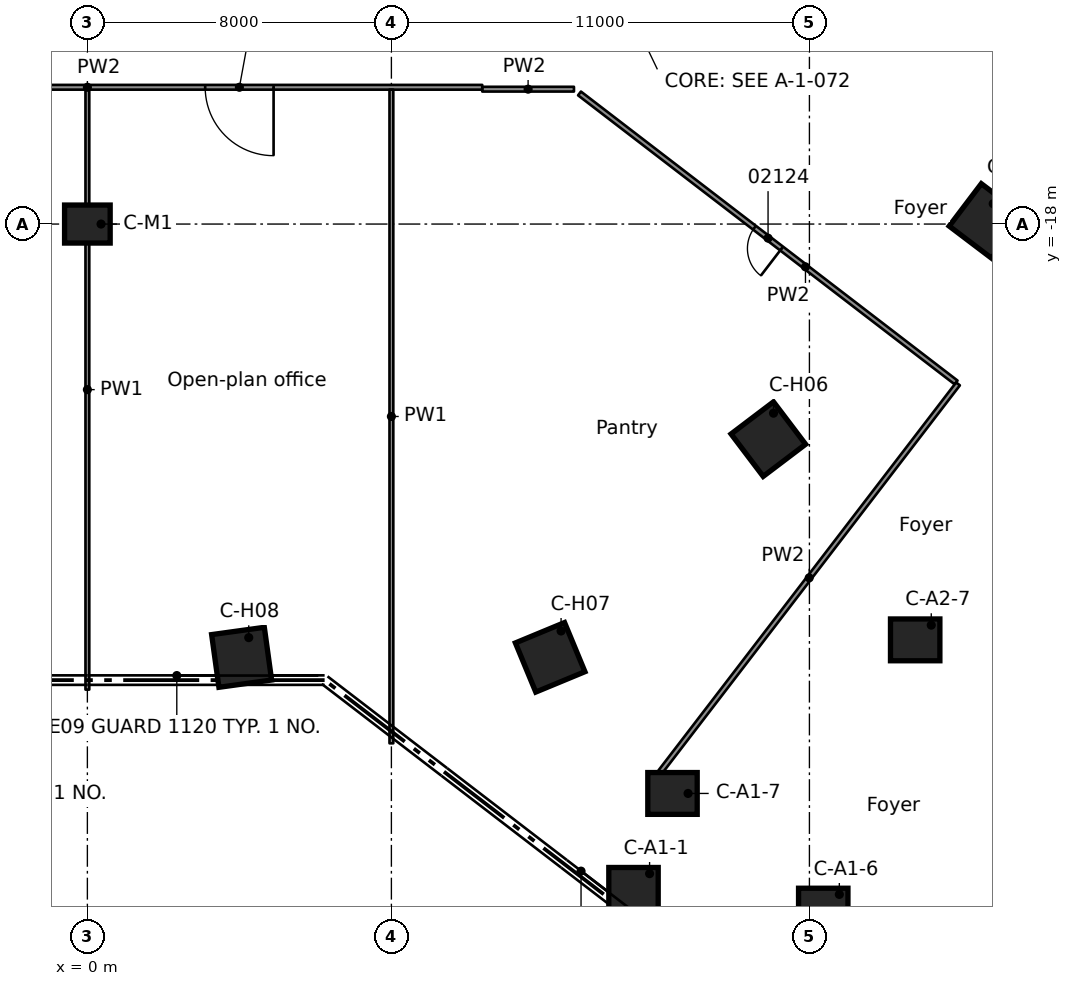
"""IFC4 building model, lengths in metres.
Left out: names, types, materials, properties, quantities, classifications, styles, units other than length and angle.
Written with IfcOpenShell. Run it as: python <this file> out.ifc"""

import sys

from ifc_helpers import new_model, si_unit, direction, frame, frame_2d, origin, origin_2d, place, context, subcontext, project, spatial, rectangle, extrude, element, fill, save


model = new_model("IFC4")
c1 = context("Model", 3, precision=1e-05, world=origin(), true_north=direction((0.0, 1.0)))
c2 = subcontext(c1, "Body", "Model", "MODEL_VIEW")
j1 = project(units=[si_unit("LENGTHUNIT", "METRE"), si_unit("PLANEANGLEUNIT", "RADIAN")], contexts=[c1])
p1 = place(None, origin())
s1 = spatial("IfcSite", under=j1, at=p1, CompositionType="ELEMENT")
p2 = place(p1, origin())
s2 = spatial("IfcBuilding", under=s1, at=p2, CompositionType="ELEMENT")
p3 = place(p2, frame((0.0, 0.0, 10.5)))
s3 = spatial("IfcBuildingStorey", under=s2, at=p3, CompositionType="ELEMENT", Elevation=10.5)
p4 = place(p3, frame((14.371, -35.48, -1.0), z_axis=(0.0, 0.0, 1.0), x_axis=(0.707106781187, 0.707106781187, 0.0)))
e1 = element("IfcColumn", 1, at=p4, inside=s3, PredefinedType="COLUMN", context=c2, shape_type="SweptSolid", body=[
    extrude(rectangle(XDim=2.4, YDim=2.4, at=origin_2d()), origin(), (0.0, 0.0, 1.0), 1.0),
])
p5 = place(p3, frame((19.364, -36.026, -1.0), z_axis=(0.0, 0.0, 1.0), x_axis=(0.707106781187, 0.707106781187, 0.0)))
e2 = element("IfcColumn", 2, at=p5, inside=s3, PredefinedType="COLUMN", context=c2, shape_type="SweptSolid", body=[
    extrude(rectangle(XDim=3.4, YDim=3.4, at=origin_2d()), origin(), (0.0, 0.0, 1.0), 1.0),
])
p6 = place(p3, frame((15.397, -32.982, -1.0), z_axis=(0.0, 0.0, 1.0), x_axis=(0.707106781187, 0.707106781187, 0.0)))
e3 = element("IfcColumn", 3, at=p6, inside=s3, PredefinedType="COLUMN", context=c2, shape_type="SweptSolid", body=[
    extrude(rectangle(XDim=2.4, YDim=2.4, at=origin_2d()), origin(), (0.0, 0.0, 1.0), 1.0),
])
p7 = place(p3, frame((25.274, -31.62, -1.0), z_axis=(0.0, 0.0, 1.0), x_axis=(0.707106781187, 0.707106781187, 0.0)))
e4 = element("IfcColumn", 4, at=p7, inside=s3, PredefinedType="COLUMN", context=c2, shape_type="SweptSolid", body=[
    extrude(rectangle(XDim=2.55, YDim=2.55, at=origin_2d()), origin(), (0.0, 0.0, 1.0), 1.0),
])
for number, where, z_axis, x_axis in (
    (5, (21.783, -28.941, -1.0), (0.0, 0.0, 1.0), (0.707, 0.707, 0.0)),
    (6, (23.659, -17.919, -1.0), (0.0, 0.0, 1.0), (0.707, 0.707, 0.0)),
    (7, (17.919, -23.659, -1.0), (0.0, 0.0, 1.0), (0.707, 0.707, 0.0)),
    (8, (12.178, -29.4, -1.0), (0.0, 0.0, 1.0), (0.707, 0.707, 0.0)),
    (9, (4.059, -29.4, -1.0), (0.0, 0.0, 1.0), (0.707, 0.707, 0.0)),
):
    element("IfcColumn", number, at=place(p3, frame(where, z_axis=z_axis, x_axis=x_axis)), inside=s3, PredefinedType="COLUMN", context=c2, shape_type="SweptSolid", body=[
        extrude(rectangle(XDim=3.4, YDim=3.4, at=origin_2d()), origin(), (0.0, 0.0, 1.0), 1.0),
    ])
for number, where, z_axis, x_axis in (
    (10, (14.371, -35.48, 0.0), (0.0, 0.0, 1.0), (1.0, 0.0, 0.0)),
    (11, (19.364, -36.026, 0.0), (0.0, 0.0, 1.0), (1.0, 0.0, 0.0)),
    (12, (15.397, -32.982, 0.0), (0.0, 0.0, 1.0), (1.0, 0.0, 0.0)),
    (13, (21.783, -28.941, 0.0), (0.0, 0.0, 1.0), (1.0, 0.0, 0.0)),
):
    element("IfcColumn", number, at=place(p3, frame(where, z_axis=z_axis, x_axis=x_axis)), inside=s3, PredefinedType="COLUMN", context=c2, shape_type="SweptSolid", body=[
        extrude(rectangle(XDim=1.3, YDim=1.1, at=origin_2d()), origin(), (0.0, 0.0, 1.0), 5.0),
    ])
for number, where, z_axis, x_axis in (
    (14, (23.659, -17.919, 0.0), (0.0, 0.0, 1.0), (0.797, -0.604, 0.0)),
    (15, (17.919, -23.659, 0.0), (0.0, 0.0, 1.0), (0.604, -0.797, 0.0)),
    (16, (12.178, -29.4, 0.0), (0.0, 0.0, 1.0), (0.383, -0.924, 0.0)),
    (17, (4.059, -29.4, 0.0), (0.0, 0.0, 1.0), (0.137, -0.991, 0.0)),
):
    element("IfcColumn", number, at=place(p3, frame(where, z_axis=z_axis, x_axis=x_axis)), inside=s3, PredefinedType="COLUMN", context=c2, shape_type="SweptSolid", body=[
        extrude(rectangle(XDim=1.4, YDim=1.4, at=origin_2d()), origin(), (0.0, 0.0, 1.0), 5.0),
    ])
p8 = place(p3, frame((0.0, -18.0, 0.0), z_axis=(0.0, 0.0, 1.0), x_axis=(1.0, 0.0, 0.0)))
e18 = element("IfcColumn", 18, at=p8, inside=s3, PredefinedType="COLUMN", context=c2, shape_type="SweptSolid", body=[
    extrude(rectangle(XDim=1.2, YDim=1.0, at=origin_2d()), origin(), (0.0, 0.0, 1.0), 5.0),
])
p9 = place(p3, frame((22.86, -22.168, 0.0), z_axis=(0.0, 0.0, 1.0), x_axis=(-0.793328204451, 0.608794185274, 0.0)))
e19 = element("IfcWall", 19, at=p9, inside=s3, PredefinedType="PARTITIONING", context=c2, shape_type="SweptSolid", body=[
    extrude(rectangle(XDim=12.492, YDim=0.125, at=frame_2d((6.246, 0.0))), origin(), (0.0, 0.0, 1.0), 4.58),
])
p10 = place(p9, frame((5.788, 0.0, 0.0)))
e20 = element("IfcOpeningElement", 20, at=p10, cuts=e19, PredefinedType="OPENING", context=c2, shape_type="SweptSolid", body=[
    extrude(rectangle(XDim=0.9, YDim=2.1, at=frame_2d((0.45, 1.05))), frame((0.0, 0.073, 0.0), z_axis=(0.0, -1.0, 0.0), x_axis=(1.0, 0.0, 0.0)), (0.0, 0.0, 1.0), 0.145),
])
p11 = place(p3, frame((10.391, -14.451, 0.0), z_axis=(0.0, 0.0, 1.0), x_axis=(1.0, 0.0, 0.0)))
e21 = element("IfcWall", 21, at=p11, inside=s3, PredefinedType="PARTITIONING", context=c2, shape_type="SweptSolid", body=[
    extrude(rectangle(XDim=2.413, YDim=0.125, at=frame_2d((1.207, 0.0))), origin(), (0.0, 0.0, 1.0), 4.58),
])
p12 = place(p3, frame((10.391, -14.401, 0.0), z_axis=(0.0, 0.0, 1.0), x_axis=(-1.0, 0.0, 0.0)))
e22 = element("IfcWall", 22, at=p12, inside=s3, PredefinedType="PARTITIONING", context=c2, shape_type="SweptSolid", body=[
    extrude(rectangle(XDim=20.781, YDim=0.125, at=frame_2d((10.391, 0.0))), origin(), (0.0, 0.0, 1.0), 4.58),
])
p13 = place(p12, frame((13.491, 0.0, 0.0)))
e23 = element("IfcOpeningElement", 23, at=p13, cuts=e22, PredefinedType="OPENING", context=c2, shape_type="SweptSolid", body=[
    extrude(rectangle(XDim=1.8, YDim=2.1, at=frame_2d((0.9, 1.05))), frame((0.0, 0.073, 0.0), z_axis=(0.0, -1.0, 0.0), x_axis=(1.0, 0.0, 0.0)), (0.0, 0.0, 1.0), 0.145),
])
p14 = place(p12, frame((5.491, 0.0, 0.0)))
e24 = element("IfcOpeningElement", 24, at=p14, cuts=e22, PredefinedType="OPENING", context=c2, shape_type="SweptSolid", body=[
    extrude(rectangle(XDim=1.8, YDim=2.1, at=frame_2d((0.9, 1.05))), frame((0.0, 0.073, 0.0), z_axis=(0.0, -1.0, 0.0), x_axis=(1.0, 0.0, 0.0)), (0.0, 0.0, 1.0), 0.145),
])
p15 = place(p3, frame((15.078, -32.412, 0.0), z_axis=(0.0, 0.0, 1.0), x_axis=(0.608793231938, 0.793328936033, 0.0)))
e25 = element("IfcWall", 25, at=p15, inside=s3, PredefinedType="PARTITIONING", context=c2, shape_type="SweptSolid", body=[
    extrude(rectangle(XDim=12.865, YDim=0.125, at=frame_2d((6.432, 0.0))), origin(), (0.0, 0.0, 1.0), 4.58),
])
p16 = place(p3, frame((8.0, -31.663, 0.0), z_axis=(0.0, 0.0, 1.0), x_axis=(0.0, 1.0, 0.0)))
e26 = element("IfcWall", 26, at=p16, inside=s3, PredefinedType="PARTITIONING", context=c2, shape_type="SweptSolid", body=[
    extrude(rectangle(XDim=17.2, YDim=0.1, at=frame_2d((8.6, 0.0))), origin(), (0.0, 0.0, 1.0), 4.58),
])
p17 = place(p3, frame((0.0, -30.25, 0.0), z_axis=(0.0, 0.0, 1.0), x_axis=(0.0, 1.0, 0.0)))
e27 = element("IfcWall", 27, at=p17, inside=s3, PredefinedType="PARTITIONING", context=c2, shape_type="SweptSolid", body=[
    extrude(rectangle(XDim=15.787, YDim=0.1, at=frame_2d((7.894, 0.0))), origin(), (0.0, 0.0, 1.0), 4.58),
])
p18 = place(p14, origin())
e28 = element("IfcDoor", 28, at=p18, inside=s3, OperationType="DOUBLE_DOOR_SINGLE_SWING", PredefinedType="DOOR", context=c2, shape_type="SweptSolid", body=[
    extrude(rectangle(XDim=1.8, YDim=2.1, at=frame_2d((0.9, 1.05))), frame((0.0, 0.025, 0.0), z_axis=(0.0, -1.0, 0.0), x_axis=(1.0, 0.0, 0.0)), (0.0, 0.0, 1.0), 0.05),
])
fill(e24, e28)
p19 = place(p10, origin())
e29 = element("IfcDoor", 29, at=p19, inside=s3, OperationType="SINGLE_SWING_LEFT", PredefinedType="DOOR", context=c2, shape_type="SweptSolid", body=[
    extrude(rectangle(XDim=0.9, YDim=2.1, at=frame_2d((0.45, 1.05))), frame((0.0, 0.025, 0.0), z_axis=(0.0, -1.0, 0.0), x_axis=(1.0, 0.0, 0.0)), (0.0, 0.0, 1.0), 0.05),
])
fill(e20, e29)
save(model, sys.argv[1])
